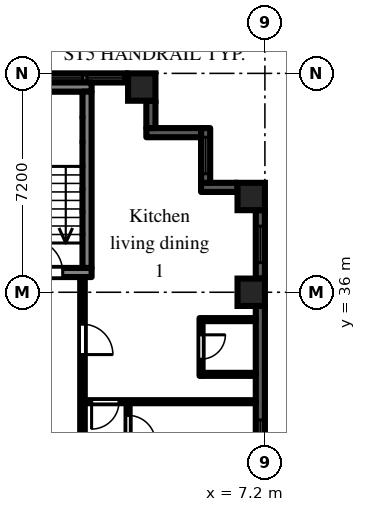
"""IFC4 building model, lengths in metres.
Left out: names, types, materials, properties, quantities, classifications, styles, units other than length and angle.
Written with IfcOpenShell. Run it as: python <this file> out.ifc"""

import sys

from ifc_helpers import new_model, si_unit, direction, frame, frame_2d, origin, origin_2d, place, context, subcontext, project, spatial, rectangle, extrude, element, fill, save


model = new_model("IFC4")
c1 = context("Model", 3, precision=1e-05, world=origin(), true_north=direction((0.0, 1.0)))
c2 = subcontext(c1, "Body", "Model", "MODEL_VIEW")
j1 = project(units=[si_unit("LENGTHUNIT", "METRE"), si_unit("PLANEANGLEUNIT", "RADIAN")], contexts=[c1])
p1 = place(None, origin())
s1 = spatial("IfcSite", under=j1, at=p1, CompositionType="ELEMENT")
p2 = place(p1, origin())
s2 = spatial("IfcBuilding", under=s1, at=p2, CompositionType="ELEMENT")
p3 = place(p2, frame((0.0, 0.0, 53.7)))
s3 = spatial("IfcBuildingStorey", under=s2, at=p3, CompositionType="ELEMENT", Elevation=53.7)
for number, where, z_axis, x_axis in (
    (1, (3.15, 42.75, 0.0), (0.0, 0.0, 1.0), (1.0, 0.0, 0.0)),
    (2, (6.75, 36.0, 0.0), (0.0, 0.0, 1.0), (1.0, 0.0, 0.0)),
    (3, (6.75, 39.15, 0.0), (0.0, 0.0, 1.0), (1.0, 0.0, 0.0)),
):
    element("IfcColumn", number, at=place(p3, frame(where, z_axis=z_axis, x_axis=x_axis)), inside=s3, PredefinedType="COLUMN", context=c2, shape_type="SweptSolid", body=[
        extrude(rectangle(XDim=0.9, YDim=0.9, at=origin_2d()), origin(), (0.0, 0.0, 1.0), 3.0),
    ])
p4 = place(p3, frame((7.05, 29.25, 0.0), z_axis=(0.0, 0.0, 1.0), x_axis=(0.0, 1.0, 0.0)))
e4 = element("IfcWall", 4, at=p4, inside=s3, PredefinedType="SOLIDWALL", context=c2, shape_type="SweptSolid", body=[
    extrude(rectangle(XDim=6.3, YDim=0.3, at=frame_2d((3.15, 0.0))), origin(), (0.0, 0.0, 1.0), 2.1),
])
p5 = place(p4, frame((0.15, 0.0, 0.2)))
e5 = element("IfcOpeningElement", 5, at=p5, cuts=e4, PredefinedType="OPENING", context=c2, shape_type="SweptSolid", body=[
    extrude(rectangle(XDim=2.4, YDim=1.85, at=frame_2d((1.2, 0.925))), frame((0.0, 0.16, 0.0), z_axis=(0.0, -1.0, 0.0), x_axis=(1.0, 0.0, 0.0)), (0.0, 0.0, 1.0), 0.32),
])
p6 = place(p3, frame((7.05, 36.45, 0.0), z_axis=(0.0, 0.0, 1.0), x_axis=(0.0, 1.0, 0.0)))
e6 = element("IfcWall", 6, at=p6, inside=s3, PredefinedType="SOLIDWALL", context=c2, shape_type="SweptSolid", body=[
    extrude(rectangle(XDim=2.25, YDim=0.3, at=frame_2d((1.125, 0.0))), origin(), (0.0, 0.0, 1.0), 2.1),
])
p7 = place(p6, frame((0.525, 0.0, 0.2)))
e7 = element("IfcOpeningElement", 7, at=p7, cuts=e6, PredefinedType="OPENING", context=c2, shape_type="SweptSolid", body=[
    extrude(rectangle(XDim=1.2, YDim=1.85, at=frame_2d((0.6, 0.925))), frame((0.0, 0.16, 0.0), z_axis=(0.0, -1.0, 0.0), x_axis=(1.0, 0.0, 0.0)), (0.0, 0.0, 1.0), 0.32),
])
p8 = place(p3, frame((6.3, 39.45, 0.0), z_axis=(0.0, 0.0, 1.0), x_axis=(-1.0, 0.0, 0.0)))
e8 = element("IfcWall", 8, at=p8, inside=s3, PredefinedType="SOLIDWALL", context=c2, shape_type="SweptSolid", body=[
    extrude(rectangle(XDim=1.2, YDim=0.3, at=frame_2d((0.6, 0.0))), origin(), (0.0, 0.0, 1.0), 2.575),
])
p9 = place(p3, frame((5.25, 39.6, 0.0), z_axis=(0.0, 0.0, 1.0), x_axis=(0.0, 1.0, 0.0)))
e9 = element("IfcWall", 9, at=p9, inside=s3, PredefinedType="SOLIDWALL", context=c2, shape_type="SweptSolid", body=[
    extrude(rectangle(XDim=1.8, YDim=0.3, at=frame_2d((0.9, 0.0))), origin(), (0.0, 0.0, 1.0), 2.575),
])
p10 = place(p9, frame((0.3, 0.0, 0.2)))
e10 = element("IfcOpeningElement", 10, at=p10, cuts=e9, PredefinedType="OPENING", context=c2, shape_type="SweptSolid", body=[
    extrude(rectangle(XDim=1.2, YDim=1.85, at=frame_2d((0.6, 0.925))), frame((0.0, 0.16, 0.0), z_axis=(0.0, -1.0, 0.0), x_axis=(1.0, 0.0, 0.0)), (0.0, 0.0, 1.0), 0.32),
])
p11 = place(p3, frame((5.1, 41.25, 0.0), z_axis=(0.0, 0.0, 1.0), x_axis=(-1.0, 0.0, 0.0)))
e11 = element("IfcWall", 11, at=p11, inside=s3, PredefinedType="SOLIDWALL", context=c2, shape_type="SweptSolid", body=[
    extrude(rectangle(XDim=1.8, YDim=0.3, at=frame_2d((0.9, 0.0))), origin(), (0.0, 0.0, 1.0), 2.575),
])
p12 = place(p3, frame((3.45, 41.4, 0.0), z_axis=(0.0, 0.0, 1.0), x_axis=(0.0, 1.0, 0.0)))
e12 = element("IfcWall", 12, at=p12, inside=s3, PredefinedType="SOLIDWALL", context=c2, shape_type="SweptSolid", body=[
    extrude(rectangle(XDim=0.9, YDim=0.3, at=frame_2d((0.45, 0.0))), origin(), (0.0, 0.0, 1.0), 2.575),
])
p13 = place(p3, frame((2.7, 43.05, 0.0), z_axis=(0.0, 0.0, 1.0), x_axis=(-1.0, 0.0, 0.0)))
e13 = element("IfcWall", 13, at=p13, inside=s3, PredefinedType="SOLIDWALL", context=c2, shape_type="SweptSolid", body=[
    extrude(rectangle(XDim=5.4, YDim=0.3, at=frame_2d((2.7, 0.0))), origin(), (0.0, 0.0, 1.0), 2.1),
])
p14 = place(p13, frame((1.5, 0.0, 0.2)))
e14 = element("IfcOpeningElement", 14, at=p14, cuts=e13, PredefinedType="OPENING", context=c2, shape_type="SweptSolid", body=[
    extrude(rectangle(XDim=2.4, YDim=1.85, at=frame_2d((1.2, 0.925))), frame((0.0, 0.16, 0.0), z_axis=(0.0, -1.0, 0.0), x_axis=(1.0, 0.0, 0.0)), (0.0, 0.0, 1.0), 0.32),
])
p15 = place(p13, frame((0.15, 0.0, 0.2)))
e15 = element("IfcOpeningElement", 15, at=p15, cuts=e13, PredefinedType="OPENING", context=c2, shape_type="SweptSolid", body=[
    extrude(rectangle(XDim=1.2, YDim=1.85, at=frame_2d((0.6, 0.925))), frame((0.0, 0.16, 0.0), z_axis=(0.0, -1.0, 0.0), x_axis=(1.0, 0.0, 0.0)), (0.0, 0.0, 1.0), 0.32),
])
p16 = place(p13, frame((4.05, 0.0, 0.2)))
e16 = element("IfcOpeningElement", 16, at=p16, cuts=e13, PredefinedType="OPENING", context=c2, shape_type="SweptSolid", body=[
    extrude(rectangle(XDim=1.2, YDim=1.85, at=frame_2d((0.6, 0.925))), frame((0.0, 0.16, 0.0), z_axis=(0.0, -1.0, 0.0), x_axis=(1.0, 0.0, 0.0)), (0.0, 0.0, 1.0), 0.32),
])
p17 = place(p3, frame((-1.5, 36.65, 0.0), z_axis=(0.0, 0.0, 1.0), x_axis=(1.0, 0.0, 0.0)))
e17 = element("IfcWall", 17, at=p17, inside=s3, PredefinedType="SHEAR", context=c2, shape_type="SweptSolid", body=[
    extrude(rectangle(XDim=3.0, YDim=0.3, at=frame_2d((1.5, 0.0))), origin(), (0.0, 0.0, 1.0), 2.575),
])
p18 = place(p17, frame((0.95, 0.0, 0.0)))
e18 = element("IfcOpeningElement", 18, at=p18, cuts=e17, PredefinedType="OPENING", context=c2, shape_type="SweptSolid", body=[
    extrude(rectangle(XDim=1.1, YDim=2.1, at=frame_2d((0.55, 1.05))), frame((0.0, 0.16, 0.0), z_axis=(0.0, -1.0, 0.0), x_axis=(1.0, 0.0, 0.0)), (0.0, 0.0, 1.0), 0.32),
])
p19 = place(p3, frame((-1.5, 42.75, 0.0), z_axis=(0.0, 0.0, 1.0), x_axis=(1.0, 0.0, 0.0)))
e19 = element("IfcWall", 19, at=p19, inside=s3, PredefinedType="SHEAR", context=c2, shape_type="SweptSolid", body=[
    extrude(rectangle(XDim=3.0, YDim=0.3, at=frame_2d((1.5, 0.0))), origin(), (0.0, 0.0, 1.0), 2.575),
])
p20 = place(p3, frame((1.35, 36.8, 0.0), z_axis=(0.0, 0.0, 1.0), x_axis=(0.0, 1.0, 0.0)))
e20 = element("IfcWall", 20, at=p20, inside=s3, PredefinedType="SHEAR", context=c2, shape_type="SweptSolid", body=[
    extrude(rectangle(XDim=5.8, YDim=0.3, at=frame_2d((2.9, 0.0))), origin(), (0.0, 0.0, 1.0), 2.575),
])
p21 = place(p3, frame((1.2, 1.125, 0.0), z_axis=(0.0, 0.0, 1.0), x_axis=(0.0, 1.0, 0.0)))
e21 = element("IfcWall", 21, at=p21, inside=s3, PredefinedType="PARTITIONING", context=c2, shape_type="SweptSolid", body=[
    extrude(rectangle(XDim=35.375, YDim=0.15, at=frame_2d((17.688, 0.0))), origin(), (0.0, 0.0, 1.0), 2.575),
])
p22 = place(p21, frame((2.625, 0.0, 0.0)))
e22 = element("IfcOpeningElement", 22, at=p22, cuts=e21, PredefinedType="OPENING", context=c2, shape_type="SweptSolid", body=[
    extrude(rectangle(XDim=0.9, YDim=2.1, at=frame_2d((0.45, 1.05))), frame((0.0, 0.085, 0.0), z_axis=(0.0, -1.0, 0.0), x_axis=(1.0, 0.0, 0.0)), (0.0, 0.0, 1.0), 0.17),
])
p23 = place(p21, frame((7.425, 0.0, 0.0)))
e23 = element("IfcOpeningElement", 23, at=p23, cuts=e21, PredefinedType="OPENING", context=c2, shape_type="SweptSolid", body=[
    extrude(rectangle(XDim=0.9, YDim=2.1, at=frame_2d((0.45, 1.05))), frame((0.0, 0.085, 0.0), z_axis=(0.0, -1.0, 0.0), x_axis=(1.0, 0.0, 0.0)), (0.0, 0.0, 1.0), 0.17),
])
p24 = place(p21, frame((13.725, 0.0, 0.0)))
e24 = element("IfcOpeningElement", 24, at=p24, cuts=e21, PredefinedType="OPENING", context=c2, shape_type="SweptSolid", body=[
    extrude(rectangle(XDim=0.9, YDim=2.1, at=frame_2d((0.45, 1.05))), frame((0.0, 0.085, 0.0), z_axis=(0.0, -1.0, 0.0), x_axis=(1.0, 0.0, 0.0)), (0.0, 0.0, 1.0), 0.17),
])
p25 = place(p21, frame((15.525, 0.0, 0.0)))
e25 = element("IfcOpeningElement", 25, at=p25, cuts=e21, PredefinedType="OPENING", context=c2, shape_type="SweptSolid", body=[
    extrude(rectangle(XDim=0.9, YDim=2.1, at=frame_2d((0.45, 1.05))), frame((0.0, 0.085, 0.0), z_axis=(0.0, -1.0, 0.0), x_axis=(1.0, 0.0, 0.0)), (0.0, 0.0, 1.0), 0.17),
])
p26 = place(p21, frame((32.825, 0.0, 0.0)))
e26 = element("IfcOpeningElement", 26, at=p26, cuts=e21, PredefinedType="OPENING", context=c2, shape_type="SweptSolid", body=[
    extrude(rectangle(XDim=1.0, YDim=2.1, at=frame_2d((0.5, 1.05))), frame((0.0, 0.085, 0.0), z_axis=(0.0, -1.0, 0.0), x_axis=(1.0, 0.0, 0.0)), (0.0, 0.0, 1.0), 0.17),
])
p27 = place(p3, frame((1.275, 32.4, 0.0), z_axis=(0.0, 0.0, 1.0), x_axis=(1.0, 0.0, 0.0)))
e27 = element("IfcWall", 27, at=p27, inside=s3, PredefinedType="PARTITIONING", context=c2, shape_type="SweptSolid", body=[
    extrude(rectangle(XDim=5.625, YDim=0.1, at=frame_2d((2.812, 0.0))), origin(), (0.0, 0.0, 1.0), 2.575),
])
p28 = place(p27, frame((0.225, 0.0, 0.0)))
e28 = element("IfcOpeningElement", 28, at=p28, cuts=e27, PredefinedType="OPENING", context=c2, shape_type="SweptSolid", body=[
    extrude(rectangle(XDim=0.9, YDim=2.1, at=frame_2d((0.45, 1.05))), frame((0.0, 0.06, 0.0), z_axis=(0.0, -1.0, 0.0), x_axis=(1.0, 0.0, 0.0)), (0.0, 0.0, 1.0), 0.12),
])
p29 = place(p3, frame((2.7, 18.075, 0.0), z_axis=(0.0, 0.0, 1.0), x_axis=(0.0, 1.0, 0.0)))
e29 = element("IfcWall", 29, at=p29, inside=s3, PredefinedType="PARTITIONING", context=c2, shape_type="SweptSolid", body=[
    extrude(rectangle(XDim=14.275, YDim=0.1, at=frame_2d((7.138, 0.0))), origin(), (0.0, 0.0, 1.0), 2.575),
])
p30 = place(p29, frame((0.375, 0.0, 0.0)))
e30 = element("IfcOpeningElement", 30, at=p30, cuts=e29, PredefinedType="OPENING", context=c2, shape_type="SweptSolid", body=[
    extrude(rectangle(XDim=0.9, YDim=2.1, at=frame_2d((0.45, 1.05))), frame((0.0, 0.06, 0.0), z_axis=(0.0, -1.0, 0.0), x_axis=(1.0, 0.0, 0.0)), (0.0, 0.0, 1.0), 0.12),
])
p31 = place(p29, frame((5.775, 0.0, 0.0)))
e31 = element("IfcOpeningElement", 31, at=p31, cuts=e29, PredefinedType="OPENING", context=c2, shape_type="SweptSolid", body=[
    extrude(rectangle(XDim=0.9, YDim=2.1, at=frame_2d((0.45, 1.05))), frame((0.0, 0.06, 0.0), z_axis=(0.0, -1.0, 0.0), x_axis=(1.0, 0.0, 0.0)), (0.0, 0.0, 1.0), 0.12),
])
p32 = place(p29, frame((7.575, 0.0, 0.0)))
e32 = element("IfcOpeningElement", 32, at=p32, cuts=e29, PredefinedType="OPENING", context=c2, shape_type="SweptSolid", body=[
    extrude(rectangle(XDim=0.9, YDim=2.1, at=frame_2d((0.45, 1.05))), frame((0.0, 0.06, 0.0), z_axis=(0.0, -1.0, 0.0), x_axis=(1.0, 0.0, 0.0)), (0.0, 0.0, 1.0), 0.12),
])
p33 = place(p29, frame((12.975, 0.0, 0.0)))
e33 = element("IfcOpeningElement", 33, at=p33, cuts=e29, PredefinedType="OPENING", context=c2, shape_type="SweptSolid", body=[
    extrude(rectangle(XDim=0.9, YDim=2.1, at=frame_2d((0.45, 1.05))), frame((0.0, 0.06, 0.0), z_axis=(0.0, -1.0, 0.0), x_axis=(1.0, 0.0, 0.0)), (0.0, 0.0, 1.0), 0.12),
])
p34 = place(p3, frame((5.1, 33.25, 0.0), z_axis=(0.0, 0.0, 1.0), x_axis=(0.0, 1.0, 0.0)))
e34 = element("IfcWall", 34, at=p34, inside=s3, PredefinedType="PARTITIONING", context=c2, shape_type="SweptSolid", body=[
    extrude(rectangle(XDim=1.9, YDim=0.1, at=frame_2d((0.95, 0.0))), origin(), (0.0, 0.0, 1.0), 2.575),
])
p35 = place(p34, frame((0.55, 0.0, 0.0)))
e35 = element("IfcOpeningElement", 35, at=p35, cuts=e34, PredefinedType="OPENING", context=c2, shape_type="SweptSolid", body=[
    extrude(rectangle(XDim=0.8, YDim=2.1, at=frame_2d((0.4, 1.05))), frame((0.0, 0.06, 0.0), z_axis=(0.0, -1.0, 0.0), x_axis=(1.0, 0.0, 0.0)), (0.0, 0.0, 1.0), 0.12),
])
for number, where, z_axis, x_axis in (
    (36, (5.15, 33.3, 0.0), (0.0, 0.0, 1.0), (1.0, 0.0, 0.0)),
    (37, (5.15, 35.1, 0.0), (0.0, 0.0, 1.0), (1.0, 0.0, 0.0)),
):
    element("IfcWall", number, at=place(p3, frame(where, z_axis=z_axis, x_axis=x_axis)), inside=s3, PredefinedType="PARTITIONING", context=c2, shape_type="SweptSolid", body=[
        extrude(rectangle(XDim=1.75, YDim=0.1, at=frame_2d((0.875, 0.0))), origin(), (0.0, 0.0, 1.0), 2.575),
    ])
p36 = place(p5, origin())
e38 = element("IfcWindow", 38, at=p36, inside=s3, PartitioningType="SINGLE_PANEL", PredefinedType="WINDOW", context=c2, shape_type="SweptSolid", body=[
    extrude(rectangle(XDim=2.4, YDim=1.85, at=frame_2d((1.2, 0.925))), frame((0.0, 0.03, 0.0), z_axis=(0.0, -1.0, 0.0), x_axis=(1.0, 0.0, 0.0)), (0.0, 0.0, 1.0), 0.06),
])
fill(e5, e38)
p37 = place(p7, origin())
e39 = element("IfcWindow", 39, at=p37, inside=s3, PartitioningType="SINGLE_PANEL", PredefinedType="WINDOW", context=c2, shape_type="SweptSolid", body=[
    extrude(rectangle(XDim=1.2, YDim=1.85, at=frame_2d((0.6, 0.925))), frame((0.0, 0.03, 0.0), z_axis=(0.0, -1.0, 0.0), x_axis=(1.0, 0.0, 0.0)), (0.0, 0.0, 1.0), 0.06),
])
fill(e7, e39)
p38 = place(p10, origin())
e40 = element("IfcWindow", 40, at=p38, inside=s3, PartitioningType="SINGLE_PANEL", PredefinedType="WINDOW", context=c2, shape_type="SweptSolid", body=[
    extrude(rectangle(XDim=1.2, YDim=1.85, at=frame_2d((0.6, 0.925))), frame((0.0, 0.03, 0.0), z_axis=(0.0, -1.0, 0.0), x_axis=(1.0, 0.0, 0.0)), (0.0, 0.0, 1.0), 0.06),
])
fill(e10, e40)
p39 = place(p14, origin())
e41 = element("IfcWindow", 41, at=p39, inside=s3, PartitioningType="SINGLE_PANEL", PredefinedType="WINDOW", context=c2, shape_type="SweptSolid", body=[
    extrude(rectangle(XDim=2.4, YDim=1.85, at=frame_2d((1.2, 0.925))), frame((0.0, 0.03, 0.0), z_axis=(0.0, -1.0, 0.0), x_axis=(1.0, 0.0, 0.0)), (0.0, 0.0, 1.0), 0.06),
])
fill(e14, e41)
p40 = place(p15, origin())
e42 = element("IfcWindow", 42, at=p40, inside=s3, PartitioningType="SINGLE_PANEL", PredefinedType="WINDOW", context=c2, shape_type="SweptSolid", body=[
    extrude(rectangle(XDim=1.2, YDim=1.85, at=frame_2d((0.6, 0.925))), frame((0.0, 0.03, 0.0), z_axis=(0.0, -1.0, 0.0), x_axis=(1.0, 0.0, 0.0)), (0.0, 0.0, 1.0), 0.06),
])
fill(e15, e42)
p41 = place(p18, origin())
e43 = element("IfcDoor", 43, at=p41, inside=s3, OperationType="SINGLE_SWING_LEFT", PredefinedType="DOOR", context=c2, shape_type="SweptSolid", body=[
    extrude(rectangle(XDim=1.1, YDim=2.1, at=frame_2d((0.55, 1.05))), frame((0.0, 0.025, 0.0), z_axis=(0.0, -1.0, 0.0), x_axis=(1.0, 0.0, 0.0)), (0.0, 0.0, 1.0), 0.05),
])
fill(e18, e43)
p42 = place(p35, frame((0.8, 0.0, 0.0), z_axis=(0.0, 0.0, 1.0), x_axis=(-1.0, 0.0, 0.0)))
e44 = element("IfcDoor", 44, at=p42, inside=s3, OperationType="SINGLE_SWING_LEFT", PredefinedType="DOOR", context=c2, shape_type="SweptSolid", body=[
    extrude(rectangle(XDim=0.8, YDim=2.1, at=frame_2d((0.4, 1.05))), frame((0.0, 0.025, 0.0), z_axis=(0.0, -1.0, 0.0), x_axis=(1.0, 0.0, 0.0)), (0.0, 0.0, 1.0), 0.05),
])
fill(e35, e44)
p43 = place(p26, frame((1.0, 0.0, 0.0), z_axis=(0.0, 0.0, 1.0), x_axis=(-1.0, 0.0, 0.0)))
e45 = element("IfcDoor", 45, at=p43, inside=s3, OperationType="SINGLE_SWING_RIGHT", PredefinedType="DOOR", context=c2, shape_type="SweptSolid", body=[
    extrude(rectangle(XDim=1.0, YDim=2.1, at=frame_2d((0.5, 1.05))), frame((0.0, 0.025, 0.0), z_axis=(0.0, -1.0, 0.0), x_axis=(1.0, 0.0, 0.0)), (0.0, 0.0, 1.0), 0.05),
])
fill(e26, e45)
p44 = place(p28, frame((0.9, 0.0, 0.0), z_axis=(0.0, 0.0, 1.0), x_axis=(-1.0, 0.0, 0.0)))
e46 = element("IfcDoor", 46, at=p44, inside=s3, OperationType="SINGLE_SWING_RIGHT", PredefinedType="DOOR", context=c2, shape_type="SweptSolid", body=[
    extrude(rectangle(XDim=0.9, YDim=2.1, at=frame_2d((0.45, 1.05))), frame((0.0, 0.025, 0.0), z_axis=(0.0, -1.0, 0.0), x_axis=(1.0, 0.0, 0.0)), (0.0, 0.0, 1.0), 0.05),
])
fill(e28, e46)
p45 = place(p33, frame((0.9, 0.0, 0.0), z_axis=(0.0, 0.0, 1.0), x_axis=(-1.0, 0.0, 0.0)))
e47 = element("IfcDoor", 47, at=p45, inside=s3, OperationType="SINGLE_SWING_RIGHT", PredefinedType="DOOR", context=c2, shape_type="SweptSolid", body=[
    extrude(rectangle(XDim=0.9, YDim=2.1, at=frame_2d((0.45, 1.05))), frame((0.0, 0.025, 0.0), z_axis=(0.0, -1.0, 0.0), x_axis=(1.0, 0.0, 0.0)), (0.0, 0.0, 1.0), 0.05),
])
fill(e33, e47)
save(model, sys.argv[1])
